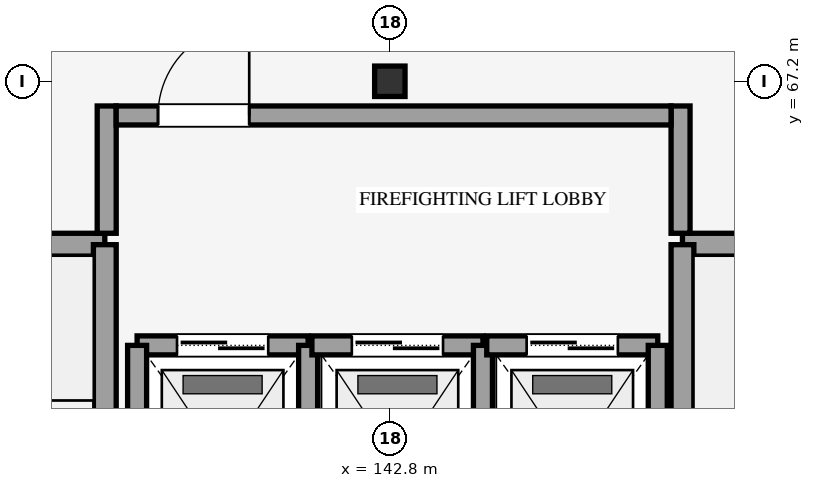
"""IFC4 building model, lengths in metres.
Left out: names, types, materials, properties, quantities, classifications, styles, units other than length and angle.
Written with IfcOpenShell. Run it as: python <this file> out.ifc"""

import sys

from ifc_helpers import new_model, si_unit, direction, frame, frame_2d, origin, origin_2d, place, context, subcontext, project, spatial, rectangle, i_section, extrude, element, fill, save


model = new_model("IFC4")
c1 = context("Model", 3, precision=1e-05, world=origin(), true_north=direction((0.0, 1.0)))
c2 = subcontext(c1, "Body", "Model", "MODEL_VIEW")
j1 = project(units=[si_unit("LENGTHUNIT", "METRE"), si_unit("PLANEANGLEUNIT", "RADIAN")], contexts=[c1])
p1 = place(None, origin())
s1 = spatial("IfcSite", under=j1, at=p1, CompositionType="ELEMENT")
p2 = place(p1, origin())
s2 = spatial("IfcBuilding", under=s1, at=p2, CompositionType="ELEMENT")
p3 = place(p2, frame((0.0, 0.0, 18.9)))
s3 = spatial("IfcBuildingStorey", under=s2, at=p3, CompositionType="ELEMENT", Elevation=18.9)
p4 = place(p3, frame((142.8, 67.2, 0.0), z_axis=(0.0, 0.0, 1.0), x_axis=(1.0, 0.0, 0.0)))
e1 = element("IfcColumn", 1, at=p4, inside=s3, PredefinedType="COLUMN", context=c2, shape_type="SweptSolid", body=[
    extrude(i_section(OverallWidth=0.4, OverallDepth=0.4, WebThickness=0.013, FlangeThickness=0.021, FilletRadius=0.022, at=origin_2d()), origin(), (0.0, 0.0, 1.0), 4.5),
])
p5 = place(p3, frame((135.05, 65.05, 0.0), z_axis=(0.0, 0.0, 1.0), x_axis=(1.0, 0.0, 0.0)))
e2 = element("IfcWall", 2, at=p5, inside=s3, PredefinedType="SHEAR", context=c2, shape_type="SweptSolid", body=[
    extrude(rectangle(XDim=4.0, YDim=0.3, at=frame_2d((2.0, 0.0))), origin(), (0.0, 0.0, 1.0), 4.5),
])
p6 = place(p3, frame((139.05, 50.75, 0.0), z_axis=(0.0, 0.0, 1.0), x_axis=(0.0, 1.0, 0.0)))
e3 = element("IfcWall", 3, at=p6, inside=s3, PredefinedType="SHEAR", context=c2, shape_type="SweptSolid", body=[
    extrude(rectangle(XDim=14.3, YDim=0.3, at=frame_2d((7.15, 0.0))), origin(), (0.0, 0.0, 1.0), 4.5),
])
p7 = place(p3, frame((146.65, 65.05, 0.0), z_axis=(0.0, 0.0, 1.0), x_axis=(1.0, 0.0, 0.0)))
e4 = element("IfcWall", 4, at=p7, inside=s3, PredefinedType="SHEAR", context=c2, shape_type="SweptSolid", body=[
    extrude(rectangle(XDim=4.0, YDim=0.3, at=frame_2d((2.0, 0.0))), origin(), (0.0, 0.0, 1.0), 4.5),
])
p8 = place(p3, frame((146.65, 50.75, 0.0), z_axis=(0.0, 0.0, 1.0), x_axis=(0.0, 1.0, 0.0)))
e5 = element("IfcWall", 5, at=p8, inside=s3, PredefinedType="SHEAR", context=c2, shape_type="SweptSolid", body=[
    extrude(rectangle(XDim=14.3, YDim=0.3, at=frame_2d((7.15, 0.0))), origin(), (0.0, 0.0, 1.0), 4.5),
])
p9 = place(p3, frame((139.475, 63.725, 0.0), z_axis=(0.0, 0.0, 1.0), x_axis=(1.0, 0.0, 0.0)))
e6 = element("IfcWall", 6, at=p9, inside=s3, PredefinedType="SHEAR", context=c2, shape_type="SweptSolid", body=[
    extrude(rectangle(XDim=2.25, YDim=0.25, at=frame_2d((1.125, 0.0))), origin(), (0.0, 0.0, 1.0), 4.24),
])
p10 = place(p9, frame((0.525, 0.0, 0.0)))
e7 = element("IfcOpeningElement", 7, at=p10, cuts=e6, PredefinedType="OPENING", context=c2, shape_type="SweptSolid", body=[
    extrude(rectangle(XDim=1.2, YDim=2.18, at=frame_2d((0.6, 1.09))), frame((0.0, 0.135, 0.0), z_axis=(0.0, -1.0, 0.0), x_axis=(1.0, 0.0, 0.0)), (0.0, 0.0, 1.0), 0.27),
])
for number, where, z_axis, x_axis in (
    (8, (139.475, 60.675, 0.0), (0.0, 0.0, 1.0), (0.0, 1.0, 0.0)),
    (9, (141.725, 60.675, 0.0), (0.0, 0.0, 1.0), (0.0, 1.0, 0.0)),
):
    element("IfcWall", number, at=place(p3, frame(where, z_axis=z_axis, x_axis=x_axis)), inside=s3, PredefinedType="SHEAR", context=c2, shape_type="SweptSolid", body=[
        extrude(rectangle(XDim=3.05, YDim=0.25, at=frame_2d((1.525, 0.0))), origin(), (0.0, 0.0, 1.0), 4.24),
    ])
p11 = place(p3, frame((141.775, 63.725, 0.0), z_axis=(0.0, 0.0, 1.0), x_axis=(1.0, 0.0, 0.0)))
e10 = element("IfcWall", 10, at=p11, inside=s3, PredefinedType="SHEAR", context=c2, shape_type="SweptSolid", body=[
    extrude(rectangle(XDim=2.25, YDim=0.25, at=frame_2d((1.125, 0.0))), origin(), (0.0, 0.0, 1.0), 4.24),
])
p12 = place(p11, frame((0.525, 0.0, 0.0)))
e11 = element("IfcOpeningElement", 11, at=p12, cuts=e10, PredefinedType="OPENING", context=c2, shape_type="SweptSolid", body=[
    extrude(rectangle(XDim=1.2, YDim=2.18, at=frame_2d((0.6, 1.09))), frame((0.0, 0.135, 0.0), z_axis=(0.0, -1.0, 0.0), x_axis=(1.0, 0.0, 0.0)), (0.0, 0.0, 1.0), 0.27),
])
p13 = place(p3, frame((144.025, 60.675, 0.0), z_axis=(0.0, 0.0, 1.0), x_axis=(0.0, 1.0, 0.0)))
e12 = element("IfcWall", 12, at=p13, inside=s3, PredefinedType="SHEAR", context=c2, shape_type="SweptSolid", body=[
    extrude(rectangle(XDim=3.05, YDim=0.25, at=frame_2d((1.525, 0.0))), origin(), (0.0, 0.0, 1.0), 4.24),
])
p14 = place(p3, frame((144.075, 63.725, 0.0), z_axis=(0.0, 0.0, 1.0), x_axis=(1.0, 0.0, 0.0)))
e13 = element("IfcWall", 13, at=p14, inside=s3, PredefinedType="SHEAR", context=c2, shape_type="SweptSolid", body=[
    extrude(rectangle(XDim=2.25, YDim=0.25, at=frame_2d((1.125, 0.0))), origin(), (0.0, 0.0, 1.0), 4.24),
])
p15 = place(p14, frame((0.525, 0.0, 0.0)))
e14 = element("IfcOpeningElement", 14, at=p15, cuts=e13, PredefinedType="OPENING", context=c2, shape_type="SweptSolid", body=[
    extrude(rectangle(XDim=1.2, YDim=2.18, at=frame_2d((0.6, 1.09))), frame((0.0, 0.135, 0.0), z_axis=(0.0, -1.0, 0.0), x_axis=(1.0, 0.0, 0.0)), (0.0, 0.0, 1.0), 0.27),
])
p16 = place(p3, frame((146.325, 60.675, 0.0), z_axis=(0.0, 0.0, 1.0), x_axis=(0.0, 1.0, 0.0)))
e15 = element("IfcWall", 15, at=p16, inside=s3, PredefinedType="SHEAR", context=c2, shape_type="SweptSolid", body=[
    extrude(rectangle(XDim=3.05, YDim=0.25, at=frame_2d((1.525, 0.0))), origin(), (0.0, 0.0, 1.0), 4.24),
])
for number, where, z_axis, x_axis in (
    (16, (139.075, 65.2, 0.0), (0.0, 0.0, 1.0), (0.0, 1.0, 0.0)),
    (17, (146.625, 65.2, 0.0), (0.0, 0.0, 1.0), (0.0, 1.0, 0.0)),
):
    element("IfcWall", number, at=place(p3, frame(where, z_axis=z_axis, x_axis=x_axis)), inside=s3, PredefinedType="SHEAR", context=c2, shape_type="SweptSolid", body=[
        extrude(rectangle(XDim=1.675, YDim=0.25, at=frame_2d((0.837, 0.0))), origin(), (0.0, 0.0, 1.0), 4.24),
    ])
p17 = place(p3, frame((139.2, 66.75, 0.0), z_axis=(0.0, 0.0, 1.0), x_axis=(1.0, 0.0, 0.0)))
e18 = element("IfcWall", 18, at=p17, inside=s3, PredefinedType="SHEAR", context=c2, shape_type="SweptSolid", body=[
    extrude(rectangle(XDim=7.3, YDim=0.25, at=frame_2d((3.65, 0.0))), origin(), (0.0, 0.0, 1.0), 4.22),
])
p18 = place(p17, frame((0.55, 0.0, 0.0)))
e19 = element("IfcOpeningElement", 19, at=p18, cuts=e18, PredefinedType="OPENING", context=c2, shape_type="SweptSolid", body=[
    extrude(rectangle(XDim=1.2, YDim=2.15, at=frame_2d((0.6, 1.075))), frame((0.0, 0.135, 0.0), z_axis=(0.0, -1.0, 0.0), x_axis=(1.0, 0.0, 0.0)), (0.0, 0.0, 1.0), 0.27),
])
p19 = place(p10, origin())
e20 = element("IfcDoor", 20, at=p19, inside=s3, OperationType="DOUBLE_DOOR_SLIDING", PredefinedType="DOOR", context=c2, shape_type="SweptSolid", body=[
    extrude(rectangle(XDim=1.2, YDim=2.18, at=frame_2d((0.6, 1.09))), frame((0.0, 0.025, 0.0), z_axis=(0.0, -1.0, 0.0), x_axis=(1.0, 0.0, 0.0)), (0.0, 0.0, 1.0), 0.05),
])
fill(e7, e20)
p20 = place(p12, origin())
e21 = element("IfcDoor", 21, at=p20, inside=s3, OperationType="DOUBLE_DOOR_SLIDING", PredefinedType="DOOR", context=c2, shape_type="SweptSolid", body=[
    extrude(rectangle(XDim=1.2, YDim=2.18, at=frame_2d((0.6, 1.09))), frame((0.0, 0.025, 0.0), z_axis=(0.0, -1.0, 0.0), x_axis=(1.0, 0.0, 0.0)), (0.0, 0.0, 1.0), 0.05),
])
fill(e11, e21)
p21 = place(p15, origin())
e22 = element("IfcDoor", 22, at=p21, inside=s3, OperationType="DOUBLE_DOOR_SLIDING", PredefinedType="DOOR", context=c2, shape_type="SweptSolid", body=[
    extrude(rectangle(XDim=1.2, YDim=2.18, at=frame_2d((0.6, 1.09))), frame((0.0, 0.025, 0.0), z_axis=(0.0, -1.0, 0.0), x_axis=(1.0, 0.0, 0.0)), (0.0, 0.0, 1.0), 0.05),
])
fill(e14, e22)
p22 = place(p18, origin())
e23 = element("IfcDoor", 23, at=p22, inside=s3, OperationType="SINGLE_SWING_RIGHT", PredefinedType="DOOR", context=c2, shape_type="SweptSolid", body=[
    extrude(rectangle(XDim=1.2, YDim=2.15, at=frame_2d((0.6, 1.075))), frame((0.0, 0.025, 0.0), z_axis=(0.0, -1.0, 0.0), x_axis=(1.0, 0.0, 0.0)), (0.0, 0.0, 1.0), 0.05),
])
fill(e19, e23)
save(model, sys.argv[1])
